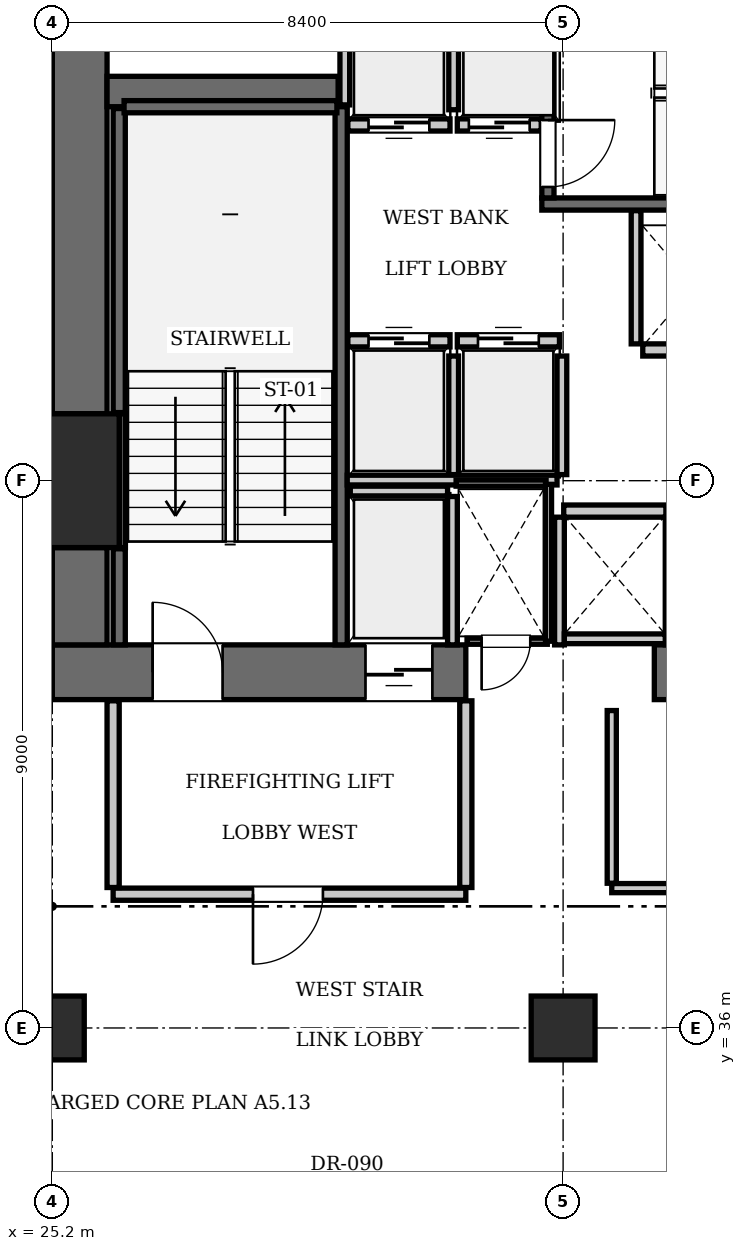
"""IFC4 building model, lengths in metres.
Left out: names, types, materials, properties, quantities, classifications, styles, units other than length and angle.
Written with IfcOpenShell. Run it as: python <this file> out.ifc"""

import sys

from ifc_helpers import new_model, si_unit, direction, frame, frame_2d, origin, origin_2d, place, context, subcontext, project, spatial, rectangle, extrude, element, fill, save


model = new_model("IFC4")
c1 = context("Model", 3, precision=1e-05, world=origin(), true_north=direction((0.0, 1.0)))
c2 = subcontext(c1, "Body", "Model", "MODEL_VIEW")
j1 = project(units=[si_unit("LENGTHUNIT", "METRE"), si_unit("PLANEANGLEUNIT", "RADIAN")], contexts=[c1])
p1 = place(None, origin())
s1 = spatial("IfcSite", under=j1, at=p1, CompositionType="ELEMENT")
p2 = place(p1, origin())
s2 = spatial("IfcBuilding", under=s1, at=p2, CompositionType="ELEMENT")
p3 = place(p2, frame((0.0, 0.0, 107.8)))
s3 = spatial("IfcBuildingStorey", under=s2, at=p3, CompositionType="ELEMENT", Elevation=107.8)
p4 = place(p3, frame((25.2, 45.0, 0.0), z_axis=(0.0, 0.0, 1.0), x_axis=(1.0, 0.0, 0.0)))
e1 = element("IfcColumn", 1, at=p4, inside=s3, PredefinedType="COLUMN", context=c2, shape_type="SweptSolid", body=[
    extrude(rectangle(XDim=2.2, YDim=2.2, at=origin_2d()), origin(), (0.0, 0.0, 1.0), 3.85),
])
p5 = place(p3, frame((25.2, 41.85, 0.0), z_axis=(0.0, 0.0, 1.0), x_axis=(1.0, 0.0, 0.0)))
e2 = element("IfcWall", 2, at=p5, inside=s3, PredefinedType="SHEAR", context=c2, shape_type="SweptSolid", body=[
    extrude(rectangle(XDim=6.8, YDim=0.9, at=frame_2d((3.4, 0.0))), origin(), (0.0, 0.0, 1.0), 3.85),
])
p6 = place(p5, frame((1.65, 0.0, 0.0)))
e3 = element("IfcOpeningElement", 3, at=p6, cuts=e2, PredefinedType="OPENING", context=c2, shape_type="SweptSolid", body=[
    extrude(rectangle(XDim=1.15, YDim=2.15, at=frame_2d((0.575, 1.075))), frame((0.0, 0.46, 0.0), z_axis=(0.0, -1.0, 0.0), x_axis=(1.0, 0.0, 0.0)), (0.0, 0.0, 1.0), 0.92),
])
p7 = place(p5, frame((5.15, 0.0, 0.0)))
e4 = element("IfcOpeningElement", 4, at=p7, cuts=e2, PredefinedType="OPENING", context=c2, shape_type="SweptSolid", body=[
    extrude(rectangle(XDim=1.1, YDim=2.2, at=frame_2d((0.55, 1.1))), frame((0.0, 0.46, 0.0), z_axis=(0.0, -1.0, 0.0), x_axis=(1.0, 0.0, 0.0)), (0.0, 0.0, 1.0), 0.92),
])
p8 = place(p3, frame((35.1, 41.85, 0.0), z_axis=(0.0, 0.0, 1.0), x_axis=(1.0, 0.0, 0.0)))
e5 = element("IfcWall", 5, at=p8, inside=s3, PredefinedType="SHEAR", context=c2, shape_type="SweptSolid", body=[
    extrude(rectangle(XDim=5.4, YDim=0.9, at=frame_2d((2.7, 0.0))), origin(), (0.0, 0.0, 1.0), 3.85),
])
p9 = place(p3, frame((25.65, 42.3, 0.0), z_axis=(0.0, 0.0, 1.0), x_axis=(0.0, 1.0, 0.0)))
e6 = element("IfcWall", 6, at=p9, inside=s3, PredefinedType="SHEAR", context=c2, shape_type="SweptSolid", body=[
    extrude(rectangle(XDim=1.6, YDim=0.9, at=frame_2d((0.8, 0.0))), origin(), (0.0, 0.0, 1.0), 3.85),
])
p10 = place(p3, frame((25.65, 46.1, 0.0), z_axis=(0.0, 0.0, 1.0), x_axis=(0.0, 1.0, 0.0)))
e7 = element("IfcWall", 7, at=p10, inside=s3, PredefinedType="SHEAR", context=c2, shape_type="SweptSolid", body=[
    extrude(rectangle(XDim=7.0, YDim=0.9, at=frame_2d((3.5, 0.0))), origin(), (0.0, 0.0, 1.0), 3.85),
])
p11 = place(p3, frame((26.1, 51.4, 0.0), z_axis=(0.0, 0.0, 1.0), x_axis=(1.0, 0.0, 0.0)))
e8 = element("IfcWall", 8, at=p11, inside=s3, PredefinedType="SHEAR", context=c2, shape_type="SweptSolid", body=[
    extrude(rectangle(XDim=3.8, YDim=0.5, at=frame_2d((1.9, 0.0))), origin(), (0.0, 0.0, 1.0), 3.85),
])
for number, where, z_axis, x_axis in (
    (9, (25.2, 36.0, 0.0), (0.0, 0.0, 1.0), (1.0, 0.0, 0.0)),
    (10, (33.6, 36.0, 0.0), (0.0, 0.0, 1.0), (1.0, 0.0, 0.0)),
):
    element("IfcColumn", number, at=place(p3, frame(where, z_axis=z_axis, x_axis=x_axis)), inside=s3, PredefinedType="COLUMN", context=c2, shape_type="SweptSolid", body=[
        extrude(rectangle(XDim=1.05, YDim=1.05, at=origin_2d()), origin(), (0.0, 0.0, 1.0), 3.85),
    ])
p12 = place(p3, frame((29.95, 42.3, 0.0), z_axis=(0.0, 0.0, 1.0), x_axis=(0.0, 1.0, 0.0)))
e11 = element("IfcWall", 11, at=p12, inside=s3, PredefinedType="SOLIDWALL", context=c2, shape_type="SweptSolid", body=[
    extrude(rectangle(XDim=8.85, YDim=0.2, at=frame_2d((4.425, 0.0))), origin(), (0.0, 0.0, 1.0), 3.61),
])
p13 = place(p3, frame((26.3, 42.3, 0.0), z_axis=(0.0, 0.0, 1.0), x_axis=(0.0, 1.0, 0.0)))
e12 = element("IfcWall", 12, at=p13, inside=s3, PredefinedType="SOLIDWALL", context=c2, shape_type="SweptSolid", body=[
    extrude(rectangle(XDim=1.58, YDim=0.2, at=frame_2d((0.79, 0.0))), origin(), (0.0, 0.0, 1.0), 3.61),
])
p14 = place(p3, frame((26.3, 46.12, 0.0), z_axis=(0.0, 0.0, 1.0), x_axis=(0.0, 1.0, 0.0)))
e13 = element("IfcWall", 13, at=p14, inside=s3, PredefinedType="SOLIDWALL", context=c2, shape_type="SweptSolid", body=[
    extrude(rectangle(XDim=5.0, YDim=0.2, at=frame_2d((2.5, 0.0))), origin(), (0.0, 0.0, 1.0), 3.61),
])
p15 = place(p3, frame((26.38, 51.15, 0.0), z_axis=(0.0, 0.0, 1.0), x_axis=(1.0, 0.0, 0.0)))
e14 = element("IfcWall", 14, at=p15, inside=s3, PredefinedType="SOLIDWALL", context=c2, shape_type="SweptSolid", body=[
    extrude(rectangle(XDim=3.5, YDim=0.2, at=frame_2d((1.75, 0.0))), origin(), (0.0, 0.0, 1.0), 3.61),
])
p16 = place(p3, frame((26.352, 43.9, 0.0), z_axis=(0.0, 0.0, 1.0), x_axis=(0.0, 1.0, 0.0)))
e15 = element("IfcWall", 15, at=p16, inside=s3, PredefinedType="SOLIDWALL", context=c2, shape_type="SweptSolid", body=[
    extrude(rectangle(XDim=2.2, YDim=0.1, at=frame_2d((1.1, 0.0))), origin(), (0.0, 0.0, 1.0), 3.61),
])
p17 = place(p3, frame((33.25, 49.55, 0.0), z_axis=(0.0, 0.0, 1.0), x_axis=(1.0, 0.0, 0.0)))
e16 = element("IfcWall", 16, at=p17, inside=s3, PredefinedType="SOLIDWALL", context=c2, shape_type="SweptSolid", body=[
    extrude(rectangle(XDim=9.1, YDim=0.2, at=frame_2d((4.55, 0.0))), origin(), (0.0, 0.0, 1.0), 3.61),
])
p18 = place(p3, frame((33.35, 49.65, 0.0), z_axis=(0.0, 0.0, 1.0), x_axis=(0.0, 1.0, 0.0)))
e17 = element("IfcWall", 17, at=p18, inside=s3, PredefinedType="SOLIDWALL", context=c2, shape_type="SweptSolid", body=[
    extrude(rectangle(XDim=3.45, YDim=0.2, at=frame_2d((1.725, 0.0))), origin(), (0.0, 0.0, 1.0), 3.61),
])
p19 = place(p18, frame((0.18, 0.0, 0.0)))
e18 = element("IfcOpeningElement", 18, at=p19, cuts=e17, PredefinedType="OPENING", context=c2, shape_type="SweptSolid", body=[
    extrude(rectangle(XDim=1.1, YDim=2.15, at=frame_2d((0.55, 1.075))), frame((0.0, 0.11, 0.0), z_axis=(0.0, -1.0, 0.0), x_axis=(1.0, 0.0, 0.0)), (0.0, 0.0, 1.0), 0.22),
])
p20 = place(p3, frame((30.06, 47.3, 0.0), z_axis=(0.0, 0.0, 1.0), x_axis=(1.0, 0.0, 0.0)))
e19 = element("IfcWall", 19, at=p20, inside=s3, PredefinedType="SOLIDWALL", context=c2, shape_type="SweptSolid", body=[
    extrude(rectangle(XDim=1.68, YDim=0.2, at=frame_2d((0.84, 0.0))), origin(), (0.0, 0.0, 1.0), 3.61),
])
p21 = place(p20, frame((0.34, 0.0, 0.0)))
e20 = element("IfcOpeningElement", 20, at=p21, cuts=e19, PredefinedType="OPENING", context=c2, shape_type="SweptSolid", body=[
    extrude(rectangle(XDim=1.0, YDim=2.15, at=frame_2d((0.5, 1.075))), frame((0.0, 0.11, 0.0), z_axis=(0.0, -1.0, 0.0), x_axis=(1.0, 0.0, 0.0)), (0.0, 0.0, 1.0), 0.22),
])
p22 = place(p3, frame((31.86, 47.3, 0.0), z_axis=(0.0, 0.0, 1.0), x_axis=(1.0, 0.0, 0.0)))
e21 = element("IfcWall", 21, at=p22, inside=s3, PredefinedType="SOLIDWALL", context=c2, shape_type="SweptSolid", body=[
    extrude(rectangle(XDim=1.68, YDim=0.2, at=frame_2d((0.84, 0.0))), origin(), (0.0, 0.0, 1.0), 3.61),
])
p23 = place(p22, frame((0.34, 0.0, 0.0)))
e22 = element("IfcOpeningElement", 22, at=p23, cuts=e21, PredefinedType="OPENING", context=c2, shape_type="SweptSolid", body=[
    extrude(rectangle(XDim=1.0, YDim=2.15, at=frame_2d((0.5, 1.075))), frame((0.0, 0.11, 0.0), z_axis=(0.0, -1.0, 0.0), x_axis=(1.0, 0.0, 0.0)), (0.0, 0.0, 1.0), 0.22),
])
p24 = place(p3, frame((30.06, 50.85, 0.0), z_axis=(0.0, 0.0, 1.0), x_axis=(1.0, 0.0, 0.0)))
e23 = element("IfcWall", 23, at=p24, inside=s3, PredefinedType="SOLIDWALL", context=c2, shape_type="SweptSolid", body=[
    extrude(rectangle(XDim=1.68, YDim=0.2, at=frame_2d((0.84, 0.0))), origin(), (0.0, 0.0, 1.0), 3.61),
])
p25 = place(p24, frame((0.34, 0.0, 0.0)))
e24 = element("IfcOpeningElement", 24, at=p25, cuts=e23, PredefinedType="OPENING", context=c2, shape_type="SweptSolid", body=[
    extrude(rectangle(XDim=1.0, YDim=2.15, at=frame_2d((0.5, 1.075))), frame((0.0, 0.11, 0.0), z_axis=(0.0, -1.0, 0.0), x_axis=(1.0, 0.0, 0.0)), (0.0, 0.0, 1.0), 0.22),
])
p26 = place(p3, frame((31.86, 50.85, 0.0), z_axis=(0.0, 0.0, 1.0), x_axis=(1.0, 0.0, 0.0)))
e25 = element("IfcWall", 25, at=p26, inside=s3, PredefinedType="SOLIDWALL", context=c2, shape_type="SweptSolid", body=[
    extrude(rectangle(XDim=1.38, YDim=0.2, at=frame_2d((0.69, 0.0))), origin(), (0.0, 0.0, 1.0), 3.61),
])
p27 = place(p26, frame((0.19, 0.0, 0.0)))
e26 = element("IfcOpeningElement", 26, at=p27, cuts=e25, PredefinedType="OPENING", context=c2, shape_type="SweptSolid", body=[
    extrude(rectangle(XDim=1.0, YDim=2.15, at=frame_2d((0.5, 1.075))), frame((0.0, 0.11, 0.0), z_axis=(0.0, -1.0, 0.0), x_axis=(1.0, 0.0, 0.0)), (0.0, 0.0, 1.0), 0.22),
])
p28 = place(p3, frame((34.91, 47.15, 0.0), z_axis=(0.0, 0.0, 1.0), x_axis=(1.0, 0.0, 0.0)))
e27 = element("IfcWall", 27, at=p28, inside=s3, PredefinedType="SOLIDWALL", context=c2, shape_type="SweptSolid", body=[
    extrude(rectangle(XDim=1.68, YDim=0.2, at=frame_2d((0.84, 0.0))), origin(), (0.0, 0.0, 1.0), 3.61),
])
p29 = place(p3, frame((33.61, 44.5, 0.0), z_axis=(0.0, 0.0, 1.0), x_axis=(1.0, 0.0, 0.0)))
e28 = element("IfcWall", 28, at=p29, inside=s3, PredefinedType="SOLIDWALL", context=c2, shape_type="SweptSolid", body=[
    extrude(rectangle(XDim=1.68, YDim=0.2, at=frame_2d((0.84, 0.0))), origin(), (0.0, 0.0, 1.0), 3.61),
])
p30 = place(p3, frame((30.1, 44.83, 0.0), z_axis=(0.0, 0.0, 1.0), x_axis=(1.0, 0.0, 0.0)))
e29 = element("IfcWall", 29, at=p30, inside=s3, PredefinedType="SOLIDWALL", context=c2, shape_type="SweptSolid", body=[
    extrude(rectangle(XDim=1.6, YDim=0.16, at=frame_2d((0.8, 0.0))), origin(), (0.0, 0.0, 1.0), 3.61),
])
p31 = place(p3, frame((31.78, 42.3, 0.0), z_axis=(0.0, 0.0, 1.0), x_axis=(0.0, 1.0, 0.0)))
e30 = element("IfcWall", 30, at=p31, inside=s3, PredefinedType="SOLIDWALL", context=c2, shape_type="SweptSolid", body=[
    extrude(rectangle(XDim=2.44, YDim=0.16, at=frame_2d((1.22, 0.0))), origin(), (0.0, 0.0, 1.0), 3.61),
])
for number, where, z_axis, x_axis in (
    (31, (31.8, 45.1, 0.0), (0.0, 0.0, 1.0), (0.0, 1.0, 0.0)),
    (32, (33.58, 45.1, 0.0), (0.0, 0.0, 1.0), (0.0, 1.0, 0.0)),
):
    element("IfcWall", number, at=place(p3, frame(where, z_axis=z_axis, x_axis=x_axis)), inside=s3, PredefinedType="SOLIDWALL", context=c2, shape_type="SweptSolid", body=[
        extrude(rectangle(XDim=1.95, YDim=0.16, at=frame_2d((0.975, 0.0))), origin(), (0.0, 0.0, 1.0), 3.61),
    ])
p32 = place(p3, frame((30.05, 45.01, 0.0), z_axis=(0.0, 0.0, 1.0), x_axis=(1.0, 0.0, 0.0)))
e33 = element("IfcWall", 33, at=p32, inside=s3, PredefinedType="SOLIDWALL", context=c2, shape_type="SweptSolid", body=[
    extrude(rectangle(XDim=3.45, YDim=0.16, at=frame_2d((1.725, 0.0))), origin(), (0.0, 0.0, 1.0), 3.61),
])
p33 = place(p3, frame((30.01, 51.18, 0.0), z_axis=(0.0, 0.0, 1.0), x_axis=(0.0, 1.0, 0.0)))
e34 = element("IfcWall", 34, at=p33, inside=s3, PredefinedType="SOLIDWALL", context=c2, shape_type="SweptSolid", body=[
    extrude(rectangle(XDim=1.92, YDim=0.16, at=frame_2d((0.96, 0.0))), origin(), (0.0, 0.0, 1.0), 3.61),
])
p34 = place(p3, frame((31.8, 51.1, 0.0), z_axis=(0.0, 0.0, 1.0), x_axis=(0.0, 1.0, 0.0)))
e35 = element("IfcWall", 35, at=p34, inside=s3, PredefinedType="SOLIDWALL", context=c2, shape_type="SweptSolid", body=[
    extrude(rectangle(XDim=2.0, YDim=0.16, at=frame_2d((1.0, 0.0))), origin(), (0.0, 0.0, 1.0), 3.61),
])
p35 = place(p3, frame((34.8, 47.25, 0.0), z_axis=(0.0, 0.0, 1.0), x_axis=(0.0, 1.0, 0.0)))
e36 = element("IfcWall", 36, at=p35, inside=s3, PredefinedType="SOLIDWALL", context=c2, shape_type="SweptSolid", body=[
    extrude(rectangle(XDim=2.19, YDim=0.16, at=frame_2d((1.095, 0.0))), origin(), (0.0, 0.0, 1.0), 3.61),
])
for number, where, z_axis, x_axis in (
    (37, (33.54, 42.3, 0.0), (0.0, 0.0, 1.0), (0.0, 1.0, 0.0)),
    (38, (35.36, 42.3, 0.0), (0.0, 0.0, 1.0), (0.0, 1.0, 0.0)),
):
    element("IfcWall", number, at=place(p3, frame(where, z_axis=z_axis, x_axis=x_axis)), inside=s3, PredefinedType="SOLIDWALL", context=c2, shape_type="SweptSolid", body=[
        extrude(rectangle(XDim=2.1, YDim=0.16, at=frame_2d((1.05, 0.0))), origin(), (0.0, 0.0, 1.0), 3.61),
    ])
p36 = place(p3, frame((33.62, 42.4, 0.0), z_axis=(0.0, 0.0, 1.0), x_axis=(1.0, 0.0, 0.0)))
e39 = element("IfcWall", 39, at=p36, inside=s3, PredefinedType="SOLIDWALL", context=c2, shape_type="SweptSolid", body=[
    extrude(rectangle(XDim=1.66, YDim=0.16, at=frame_2d((0.83, 0.0))), origin(), (0.0, 0.0, 1.0), 3.61),
])
p37 = place(p3, frame((26.2, 38.2, 0.0), z_axis=(0.0, 0.0, 1.0), x_axis=(1.0, 0.0, 0.0)))
e40 = element("IfcWall", 40, at=p37, inside=s3, PredefinedType="PARTITIONING", context=c2, shape_type="SweptSolid", body=[
    extrude(rectangle(XDim=5.8, YDim=0.2, at=frame_2d((2.9, 0.0))), origin(), (0.0, 0.0, 1.0), 3.61),
])
p38 = place(p37, frame((2.3, 0.0, 0.0)))
e41 = element("IfcOpeningElement", 41, at=p38, cuts=e40, PredefinedType="OPENING", context=c2, shape_type="SweptSolid", body=[
    extrude(rectangle(XDim=1.15, YDim=2.15, at=frame_2d((0.575, 1.075))), frame((0.0, 0.11, 0.0), z_axis=(0.0, -1.0, 0.0), x_axis=(1.0, 0.0, 0.0)), (0.0, 0.0, 1.0), 0.22),
])
for number, where, z_axis, x_axis in (
    (42, (26.2, 38.31, 0.0), (0.0, 0.0, 1.0), (0.0, 1.0, 0.0)),
    (43, (32.0, 38.31, 0.0), (0.0, 0.0, 1.0), (0.0, 1.0, 0.0)),
):
    element("IfcWall", number, at=place(p3, frame(where, z_axis=z_axis, x_axis=x_axis)), inside=s3, PredefinedType="PARTITIONING", context=c2, shape_type="SweptSolid", body=[
        extrude(rectangle(XDim=3.07, YDim=0.2, at=frame_2d((1.535, 0.0))), origin(), (0.0, 0.0, 1.0), 3.61),
    ])
p39 = place(p3, frame((32.02, 42.36, 0.0), z_axis=(0.0, 0.0, 1.0), x_axis=(1.0, 0.0, 0.0)))
e44 = element("IfcWall", 44, at=p39, inside=s3, PredefinedType="PARTITIONING", context=c2, shape_type="SweptSolid", body=[
    extrude(rectangle(XDim=1.32, YDim=0.1, at=frame_2d((0.66, 0.0))), origin(), (0.0, 0.0, 1.0), 3.61),
])
p40 = place(p39, frame((0.24, 0.0, 0.0)))
e45 = element("IfcOpeningElement", 45, at=p40, cuts=e44, PredefinedType="OPENING", context=c2, shape_type="SweptSolid", body=[
    extrude(rectangle(XDim=0.8, YDim=2.05, at=frame_2d((0.4, 1.025))), frame((0.0, 0.06, 0.0), z_axis=(0.0, -1.0, 0.0), x_axis=(1.0, 0.0, 0.0)), (0.0, 0.0, 1.0), 0.12),
])
p41 = place(p3, frame((31.84, 44.96, 0.0), z_axis=(0.0, 0.0, 1.0), x_axis=(1.0, 0.0, 0.0)))
e46 = element("IfcWall", 46, at=p41, inside=s3, PredefinedType="PARTITIONING", context=c2, shape_type="SweptSolid", body=[
    extrude(rectangle(XDim=1.48, YDim=0.1, at=frame_2d((0.74, 0.0))), origin(), (0.0, 0.0, 1.0), 3.61),
])
p42 = place(p3, frame((33.36, 42.36, 0.0), z_axis=(0.0, 0.0, 1.0), x_axis=(0.0, 1.0, 0.0)))
e47 = element("IfcWall", 47, at=p42, inside=s3, PredefinedType="PARTITIONING", context=c2, shape_type="SweptSolid", body=[
    extrude(rectangle(XDim=2.58, YDim=0.1, at=frame_2d((1.29, 0.0))), origin(), (0.0, 0.0, 1.0), 3.61),
])
p43 = place(p3, frame((34.4, 38.3, 0.0), z_axis=(0.0, 0.0, 1.0), x_axis=(1.0, 0.0, 0.0)))
e48 = element("IfcWall", 48, at=p43, inside=s3, PredefinedType="PARTITIONING", context=c2, shape_type="SweptSolid", body=[
    extrude(rectangle(XDim=2.88, YDim=0.15, at=frame_2d((1.44, 0.0))), origin(), (0.0, 0.0, 1.0), 3.61),
])
p44 = place(p43, frame((1.0, 0.0, 0.0)))
e49 = element("IfcOpeningElement", 49, at=p44, cuts=e48, PredefinedType="OPENING", context=c2, shape_type="SweptSolid", body=[
    extrude(rectangle(XDim=0.8, YDim=2.05, at=frame_2d((0.4, 1.025))), frame((0.0, 0.085, 0.0), z_axis=(0.0, -1.0, 0.0), x_axis=(1.0, 0.0, 0.0)), (0.0, 0.0, 1.0), 0.17),
])
p45 = place(p3, frame((34.4, 38.38, 0.0), z_axis=(0.0, 0.0, 1.0), x_axis=(0.0, 1.0, 0.0)))
e50 = element("IfcWall", 50, at=p45, inside=s3, PredefinedType="PARTITIONING", context=c2, shape_type="SweptSolid", body=[
    extrude(rectangle(XDim=2.84, YDim=0.15, at=frame_2d((1.42, 0.0))), origin(), (0.0, 0.0, 1.0), 3.61),
])
p46 = place(p6, origin())
e51 = element("IfcDoor", 51, at=p46, inside=s3, OperationType="SINGLE_SWING_LEFT", PredefinedType="DOOR", context=c2, shape_type="SweptSolid", body=[
    extrude(rectangle(XDim=1.15, YDim=2.15, at=frame_2d((0.575, 1.075))), frame((0.0, 0.025, 0.0), z_axis=(0.0, -1.0, 0.0), x_axis=(1.0, 0.0, 0.0)), (0.0, 0.0, 1.0), 0.05),
])
fill(e3, e51)
p47 = place(p19, frame((1.1, 0.0, 0.0), z_axis=(0.0, 0.0, 1.0), x_axis=(-1.0, 0.0, 0.0)))
e52 = element("IfcDoor", 52, at=p47, inside=s3, OperationType="SINGLE_SWING_LEFT", PredefinedType="DOOR", context=c2, shape_type="SweptSolid", body=[
    extrude(rectangle(XDim=1.1, YDim=2.15, at=frame_2d((0.55, 1.075))), frame((0.0, 0.025, 0.0), z_axis=(0.0, -1.0, 0.0), x_axis=(1.0, 0.0, 0.0)), (0.0, 0.0, 1.0), 0.05),
])
fill(e18, e52)
p48 = place(p21, origin())
e53 = element("IfcDoor", 53, at=p48, inside=s3, OperationType="SLIDING_TO_LEFT", PredefinedType="DOOR", context=c2, shape_type="SweptSolid", body=[
    extrude(rectangle(XDim=1.0, YDim=2.15, at=frame_2d((0.5, 1.075))), frame((0.0, 0.025, 0.0), z_axis=(0.0, -1.0, 0.0), x_axis=(1.0, 0.0, 0.0)), (0.0, 0.0, 1.0), 0.05),
])
fill(e20, e53)
p49 = place(p23, origin())
e54 = element("IfcDoor", 54, at=p49, inside=s3, OperationType="SLIDING_TO_LEFT", PredefinedType="DOOR", context=c2, shape_type="SweptSolid", body=[
    extrude(rectangle(XDim=1.0, YDim=2.15, at=frame_2d((0.5, 1.075))), frame((0.0, 0.025, 0.0), z_axis=(0.0, -1.0, 0.0), x_axis=(1.0, 0.0, 0.0)), (0.0, 0.0, 1.0), 0.05),
])
fill(e22, e54)
p50 = place(p25, frame((1.0, 0.0, 0.0), z_axis=(0.0, 0.0, 1.0), x_axis=(-1.0, 0.0, 0.0)))
e55 = element("IfcDoor", 55, at=p50, inside=s3, OperationType="SLIDING_TO_LEFT", PredefinedType="DOOR", context=c2, shape_type="SweptSolid", body=[
    extrude(rectangle(XDim=1.0, YDim=2.15, at=frame_2d((0.5, 1.075))), frame((0.0, 0.025, 0.0), z_axis=(0.0, -1.0, 0.0), x_axis=(1.0, 0.0, 0.0)), (0.0, 0.0, 1.0), 0.05),
])
fill(e24, e55)
p51 = place(p27, frame((1.0, 0.0, 0.0), z_axis=(0.0, 0.0, 1.0), x_axis=(-1.0, 0.0, 0.0)))
e56 = element("IfcDoor", 56, at=p51, inside=s3, OperationType="SLIDING_TO_LEFT", PredefinedType="DOOR", context=c2, shape_type="SweptSolid", body=[
    extrude(rectangle(XDim=1.0, YDim=2.15, at=frame_2d((0.5, 1.075))), frame((0.0, 0.025, 0.0), z_axis=(0.0, -1.0, 0.0), x_axis=(1.0, 0.0, 0.0)), (0.0, 0.0, 1.0), 0.05),
])
fill(e26, e56)
p52 = place(p7, frame((1.1, 0.0, 0.0), z_axis=(0.0, 0.0, 1.0), x_axis=(-1.0, 0.0, 0.0)))
e57 = element("IfcDoor", 57, at=p52, inside=s3, OperationType="SLIDING_TO_LEFT", PredefinedType="DOOR", context=c2, shape_type="SweptSolid", body=[
    extrude(rectangle(XDim=1.1, YDim=2.2, at=frame_2d((0.55, 1.1))), frame((0.0, 0.025, 0.0), z_axis=(0.0, -1.0, 0.0), x_axis=(1.0, 0.0, 0.0)), (0.0, 0.0, 1.0), 0.05),
])
fill(e4, e57)
p53 = place(p38, frame((1.15, 0.0, 0.0), z_axis=(0.0, 0.0, 1.0), x_axis=(-1.0, 0.0, 0.0)))
e58 = element("IfcDoor", 58, at=p53, inside=s3, OperationType="SINGLE_SWING_RIGHT", PredefinedType="DOOR", context=c2, shape_type="SweptSolid", body=[
    extrude(rectangle(XDim=1.15, YDim=2.15, at=frame_2d((0.575, 1.075))), frame((0.0, 0.025, 0.0), z_axis=(0.0, -1.0, 0.0), x_axis=(1.0, 0.0, 0.0)), (0.0, 0.0, 1.0), 0.05),
])
fill(e41, e58)
p54 = place(p40, frame((0.8, 0.0, 0.0), z_axis=(0.0, 0.0, 1.0), x_axis=(-1.0, 0.0, 0.0)))
e59 = element("IfcDoor", 59, at=p54, inside=s3, OperationType="SINGLE_SWING_RIGHT", PredefinedType="DOOR", context=c2, shape_type="SweptSolid", body=[
    extrude(rectangle(XDim=0.8, YDim=2.05, at=frame_2d((0.4, 1.025))), frame((0.0, 0.025, 0.0), z_axis=(0.0, -1.0, 0.0), x_axis=(1.0, 0.0, 0.0)), (0.0, 0.0, 1.0), 0.05),
])
fill(e45, e59)
save(model, sys.argv[1])
